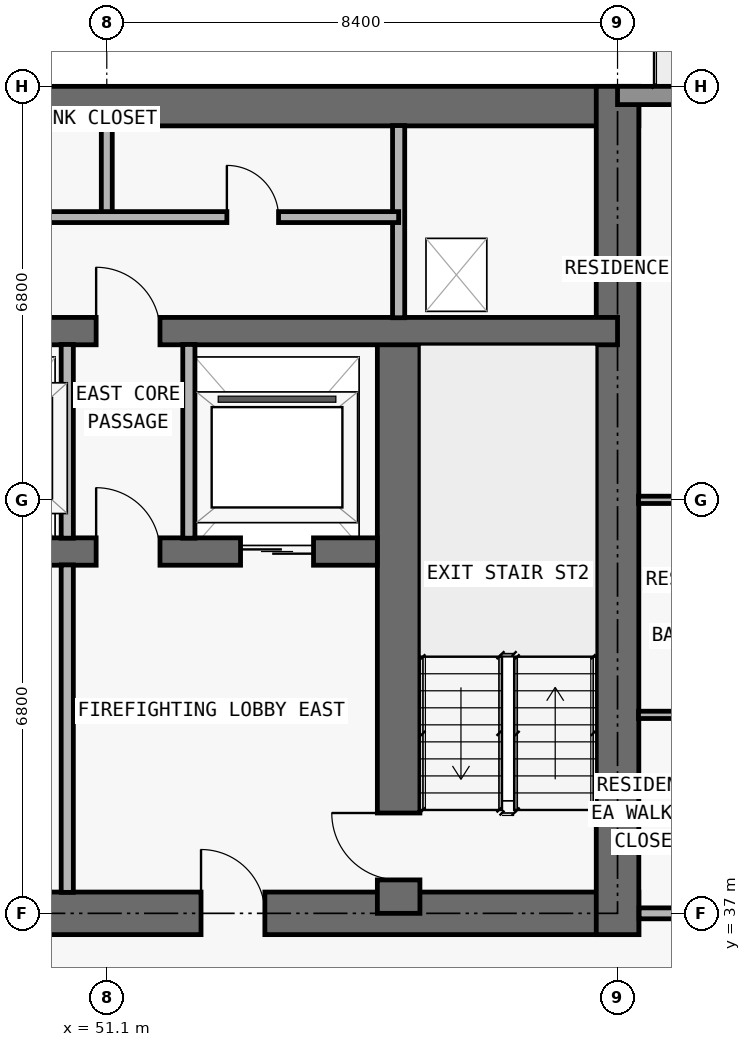
"""IFC4 building model, lengths in metres.
Left out: names, types, materials, properties, quantities, classifications, styles, units other than length and angle.
Written with IfcOpenShell. Run it as: python <this file> out.ifc"""

import sys

from ifc_helpers import new_model, si_unit, direction, frame, frame_2d, origin, place, context, subcontext, project, spatial, rectangle, extrude, element, fill, save


model = new_model("IFC4")
c1 = context("Model", 3, precision=1e-05, world=origin(), true_north=direction((0.0, 1.0)))
c2 = subcontext(c1, "Body", "Model", "MODEL_VIEW")
j1 = project(units=[si_unit("LENGTHUNIT", "METRE"), si_unit("PLANEANGLEUNIT", "RADIAN")], contexts=[c1])
p1 = place(None, origin())
s1 = spatial("IfcSite", under=j1, at=p1, CompositionType="ELEMENT")
p2 = place(p1, origin())
s2 = spatial("IfcBuilding", under=s1, at=p2, CompositionType="ELEMENT")
p3 = place(p2, frame((0.0, 0.0, 211.5)))
s3 = spatial("IfcBuildingStorey", under=s2, at=p3, CompositionType="ELEMENT", Elevation=211.5)
p4 = place(p3, frame((17.95, 37.0, 0.0), z_axis=(0.0, 0.0, 1.0), x_axis=(1.0, 0.0, 0.0)))
e1 = element("IfcWall", 1, at=p4, inside=s3, PredefinedType="SHEAR", context=c2, shape_type="SweptSolid", body=[
    extrude(rectangle(XDim=41.9, YDim=0.7, at=frame_2d((20.95, 0.0))), origin(), (0.0, 0.0, 1.0), 3.05),
])
p5 = place(p4, frame((14.35, 0.0, 0.0)))
e2 = element("IfcOpeningElement", 2, at=p5, cuts=e1, PredefinedType="OPENING", context=c2, shape_type="SweptSolid", body=[
    extrude(rectangle(XDim=1.1, YDim=2.15, at=frame_2d((0.55, 1.075))), frame((0.0, 0.36, 0.0), z_axis=(0.0, -1.0, 0.0), x_axis=(1.0, 0.0, 0.0)), (0.0, 0.0, 1.0), 0.72),
])
p6 = place(p4, frame((6.2, 0.0, 0.0)))
e3 = element("IfcOpeningElement", 3, at=p6, cuts=e1, PredefinedType="OPENING", context=c2, shape_type="SweptSolid", body=[
    extrude(rectangle(XDim=1.05, YDim=2.15, at=frame_2d((0.525, 1.075))), frame((0.0, 0.36, 0.0), z_axis=(0.0, -1.0, 0.0), x_axis=(1.0, 0.0, 0.0)), (0.0, 0.0, 1.0), 0.72),
])
p7 = place(p4, frame((34.7, 0.0, 0.0)))
e4 = element("IfcOpeningElement", 4, at=p7, cuts=e1, PredefinedType="OPENING", context=c2, shape_type="SweptSolid", body=[
    extrude(rectangle(XDim=1.05, YDim=2.15, at=frame_2d((0.525, 1.075))), frame((0.0, 0.36, 0.0), z_axis=(0.0, -1.0, 0.0), x_axis=(1.0, 0.0, 0.0)), (0.0, 0.0, 1.0), 0.72),
])
p8 = place(p4, frame((10.812, 0.0, 0.0)))
e5 = element("IfcOpeningElement", 5, at=p8, cuts=e1, PredefinedType="OPENING", context=c2, shape_type="SweptSolid", body=[
    extrude(rectangle(XDim=1.05, YDim=2.15, at=frame_2d((0.525, 1.075))), frame((0.0, 0.36, 0.0), z_axis=(0.0, -1.0, 0.0), x_axis=(1.0, 0.0, 0.0)), (0.0, 0.0, 1.0), 0.72),
])
p9 = place(p4, frame((24.05, 0.0, 0.0)))
e6 = element("IfcOpeningElement", 6, at=p9, cuts=e1, PredefinedType="OPENING", context=c2, shape_type="SweptSolid", body=[
    extrude(rectangle(XDim=1.05, YDim=2.15, at=frame_2d((0.525, 1.075))), frame((0.0, 0.36, 0.0), z_axis=(0.0, -1.0, 0.0), x_axis=(1.0, 0.0, 0.0)), (0.0, 0.0, 1.0), 0.72),
])
p10 = place(p3, frame((17.95, 50.275, 0.0), z_axis=(0.0, 0.0, 1.0), x_axis=(1.0, 0.0, 0.0)))
e7 = element("IfcWall", 7, at=p10, inside=s3, PredefinedType="SHEAR", context=c2, shape_type="SweptSolid", body=[
    extrude(rectangle(XDim=41.9, YDim=0.65, at=frame_2d((20.95, 0.0))), origin(), (0.0, 0.0, 1.0), 3.05),
])
p11 = place(p3, frame((59.5, 36.65, 0.0), z_axis=(0.0, 0.0, 1.0), x_axis=(0.0, 1.0, 0.0)))
e8 = element("IfcWall", 8, at=p11, inside=s3, PredefinedType="SHEAR", context=c2, shape_type="SweptSolid", body=[
    extrude(rectangle(XDim=13.95, YDim=0.7, at=frame_2d((6.975, 0.0))), origin(), (0.0, 0.0, 1.0), 3.05),
])
p12 = place(p3, frame((55.9, 37.0, 0.0), z_axis=(0.0, 0.0, 1.0), x_axis=(0.0, 1.0, 0.0)))
e9 = element("IfcWall", 9, at=p12, inside=s3, PredefinedType="SHEAR", context=c2, shape_type="SweptSolid", body=[
    extrude(rectangle(XDim=9.575, YDim=0.7, at=frame_2d((4.788, 0.0))), origin(), (0.0, 0.0, 1.0), 3.05),
])
p13 = place(p12, frame((0.55, 0.0, 0.0)))
e10 = element("IfcOpeningElement", 10, at=p13, cuts=e9, PredefinedType="OPENING", context=c2, shape_type="SweptSolid", body=[
    extrude(rectangle(XDim=1.1, YDim=2.15, at=frame_2d((0.55, 1.075))), frame((0.0, 0.36, 0.0), z_axis=(0.0, -1.0, 0.0), x_axis=(1.0, 0.0, 0.0)), (0.0, 0.0, 1.0), 0.72),
])
p14 = place(p3, frame((22.25, 42.95, 0.0), z_axis=(0.0, 0.0, 1.0), x_axis=(1.0, 0.0, 0.0)))
e11 = element("IfcWall", 11, at=p14, inside=s3, PredefinedType="SHEAR", context=c2, shape_type="SweptSolid", body=[
    extrude(rectangle(XDim=33.3, YDim=0.45, at=frame_2d((16.65, 0.0))), origin(), (0.0, 0.0, 1.0), 3.05),
])
p15 = place(p14, frame((1.05, 0.0, 0.0)))
e12 = element("IfcOpeningElement", 12, at=p15, cuts=e11, PredefinedType="OPENING", context=c2, shape_type="SweptSolid", body=[
    extrude(rectangle(XDim=1.2, YDim=2.2, at=frame_2d((0.6, 1.1))), frame((0.0, 0.235, 0.0), z_axis=(0.0, -1.0, 0.0), x_axis=(1.0, 0.0, 0.0)), (0.0, 0.0, 1.0), 0.47),
])
p16 = place(p14, frame((31.05, 0.0, 0.0)))
e13 = element("IfcOpeningElement", 13, at=p16, cuts=e11, PredefinedType="OPENING", context=c2, shape_type="SweptSolid", body=[
    extrude(rectangle(XDim=1.2, YDim=2.2, at=frame_2d((0.6, 1.1))), frame((0.0, 0.235, 0.0), z_axis=(0.0, -1.0, 0.0), x_axis=(1.0, 0.0, 0.0)), (0.0, 0.0, 1.0), 0.47),
])
p17 = place(p14, frame((26.45, 0.0, 0.0)))
e14 = element("IfcOpeningElement", 14, at=p17, cuts=e11, PredefinedType="OPENING", context=c2, shape_type="SweptSolid", body=[
    extrude(rectangle(XDim=1.1, YDim=2.2, at=frame_2d((0.55, 1.1))), frame((0.0, 0.235, 0.0), z_axis=(0.0, -1.0, 0.0), x_axis=(1.0, 0.0, 0.0)), (0.0, 0.0, 1.0), 0.47),
])
p18 = place(p14, frame((5.95, 0.0, 0.0)))
e15 = element("IfcOpeningElement", 15, at=p18, cuts=e11, PredefinedType="OPENING", context=c2, shape_type="SweptSolid", body=[
    extrude(rectangle(XDim=1.1, YDim=2.2, at=frame_2d((0.55, 1.1))), frame((0.0, 0.235, 0.0), z_axis=(0.0, -1.0, 0.0), x_axis=(1.0, 0.0, 0.0)), (0.0, 0.0, 1.0), 0.47),
])
p19 = place(p14, frame((3.625, 0.0, 0.0)))
e16 = element("IfcOpeningElement", 16, at=p19, cuts=e11, PredefinedType="OPENING", context=c2, shape_type="SweptSolid", body=[
    extrude(rectangle(XDim=1.05, YDim=2.15, at=frame_2d((0.525, 1.075))), frame((0.0, 0.235, 0.0), z_axis=(0.0, -1.0, 0.0), x_axis=(1.0, 0.0, 0.0)), (0.0, 0.0, 1.0), 0.47),
])
p20 = place(p14, frame((28.675, 0.0, 0.0)))
e17 = element("IfcOpeningElement", 17, at=p20, cuts=e11, PredefinedType="OPENING", context=c2, shape_type="SweptSolid", body=[
    extrude(rectangle(XDim=1.05, YDim=2.15, at=frame_2d((0.525, 1.075))), frame((0.0, 0.235, 0.0), z_axis=(0.0, -1.0, 0.0), x_axis=(1.0, 0.0, 0.0)), (0.0, 0.0, 1.0), 0.47),
])
p21 = place(p14, frame((15.225, 0.0, 0.0)))
e18 = element("IfcOpeningElement", 18, at=p21, cuts=e11, PredefinedType="OPENING", context=c2, shape_type="SweptSolid", body=[
    extrude(rectangle(XDim=1.0, YDim=2.2, at=frame_2d((0.5, 1.1))), frame((0.0, 0.235, 0.0), z_axis=(0.0, -1.0, 0.0), x_axis=(1.0, 0.0, 0.0)), (0.0, 0.0, 1.0), 0.47),
])
p22 = place(p14, frame((21.975, 0.0, 0.0)))
e19 = element("IfcOpeningElement", 19, at=p22, cuts=e11, PredefinedType="OPENING", context=c2, shape_type="SweptSolid", body=[
    extrude(rectangle(XDim=1.0, YDim=2.2, at=frame_2d((0.5, 1.1))), frame((0.0, 0.235, 0.0), z_axis=(0.0, -1.0, 0.0), x_axis=(1.0, 0.0, 0.0)), (0.0, 0.0, 1.0), 0.47),
])
p23 = place(p3, frame((18.3, 46.575, 0.0), z_axis=(0.0, 0.0, 1.0), x_axis=(1.0, 0.0, 0.0)))
e20 = element("IfcWall", 20, at=p23, inside=s3, PredefinedType="SHEAR", context=c2, shape_type="SweptSolid", body=[
    extrude(rectangle(XDim=41.2, YDim=0.45, at=frame_2d((20.6, 0.0))), origin(), (0.0, 0.0, 1.0), 3.05),
])
p24 = place(p23, frame((7.575, 0.0, 0.0)))
e21 = element("IfcOpeningElement", 21, at=p24, cuts=e20, PredefinedType="OPENING", context=c2, shape_type="SweptSolid", body=[
    extrude(rectangle(XDim=1.05, YDim=2.15, at=frame_2d((0.525, 1.075))), frame((0.0, 0.235, 0.0), z_axis=(0.0, -1.0, 0.0), x_axis=(1.0, 0.0, 0.0)), (0.0, 0.0, 1.0), 0.47),
])
p25 = place(p23, frame((32.625, 0.0, 0.0)))
e22 = element("IfcOpeningElement", 22, at=p25, cuts=e20, PredefinedType="OPENING", context=c2, shape_type="SweptSolid", body=[
    extrude(rectangle(XDim=1.05, YDim=2.15, at=frame_2d((0.525, 1.075))), frame((0.0, 0.235, 0.0), z_axis=(0.0, -1.0, 0.0), x_axis=(1.0, 0.0, 0.0)), (0.0, 0.0, 1.0), 0.47),
])
p26 = place(p3, frame((59.5, 50.45, 0.0), z_axis=(0.0, 0.0, 1.0), x_axis=(1.0, 0.0, 0.0)))
e23 = element("IfcWall", 23, at=p26, inside=s3, PredefinedType="STANDARD", context=c2, shape_type="SweptSolid", body=[
    extrude(rectangle(XDim=8.2, YDim=0.3, at=frame_2d((4.1, 0.0))), origin(), (0.0, 0.0, 1.0), 3.05),
])
p27 = place(p26, frame((3.1, 0.0, 0.0)))
e24 = element("IfcOpeningElement", 24, at=p27, cuts=e23, PredefinedType="OPENING", context=c2, shape_type="SweptSolid", body=[
    extrude(rectangle(XDim=2.0, YDim=2.3, at=frame_2d((1.0, 1.15))), frame((0.0, 0.16, 0.0), z_axis=(0.0, -1.0, 0.0), x_axis=(1.0, 0.0, 0.0)), (0.0, 0.0, 1.0), 0.32),
])
p28 = place(p3, frame((50.45, 37.345, 0.0), z_axis=(0.0, 0.0, 1.0), x_axis=(0.0, 1.0, 0.0)))
e25 = element("IfcWall", 25, at=p28, inside=s3, PredefinedType="PARTITIONING", context=c2, shape_type="SweptSolid", body=[
    extrude(rectangle(XDim=5.385, YDim=0.2, at=frame_2d((2.692, 0.0))), origin(), (0.0, 0.0, 1.0), 3.05),
])
p29 = place(p3, frame((50.45, 43.17, 0.0), z_axis=(0.0, 0.0, 1.0), x_axis=(0.0, 1.0, 0.0)))
e26 = element("IfcWall", 26, at=p29, inside=s3, PredefinedType="PARTITIONING", context=c2, shape_type="SweptSolid", body=[
    extrude(rectangle(XDim=3.185, YDim=0.2, at=frame_2d((1.593, 0.0))), origin(), (0.0, 0.0, 1.0), 3.05),
])
p30 = place(p3, frame((51.1, 48.45, 0.0), z_axis=(0.0, 0.0, 1.0), x_axis=(0.0, 1.0, 0.0)))
e27 = element("IfcWall", 27, at=p30, inside=s3, PredefinedType="PARTITIONING", context=c2, shape_type="SweptSolid", body=[
    extrude(rectangle(XDim=1.505, YDim=0.18, at=frame_2d((0.752, 0.0))), origin(), (0.0, 0.0, 1.0), 3.05),
])
p31 = place(p3, frame((52.45, 43.17, 0.0), z_axis=(0.0, 0.0, 1.0), x_axis=(0.0, 1.0, 0.0)))
e28 = element("IfcWall", 28, at=p31, inside=s3, PredefinedType="PARTITIONING", context=c2, shape_type="SweptSolid", body=[
    extrude(rectangle(XDim=3.185, YDim=0.2, at=frame_2d((1.593, 0.0))), origin(), (0.0, 0.0, 1.0), 3.05),
])
p32 = place(p3, frame((55.9, 46.795, 0.0), z_axis=(0.0, 0.0, 1.0), x_axis=(0.0, 1.0, 0.0)))
e29 = element("IfcWall", 29, at=p32, inside=s3, PredefinedType="PARTITIONING", context=c2, shape_type="SweptSolid", body=[
    extrude(rectangle(XDim=3.16, YDim=0.2, at=frame_2d((1.58, 0.0))), origin(), (0.0, 0.0, 1.0), 3.05),
])
p33 = place(p3, frame((59.855, 37.0, 0.0), z_axis=(0.0, 0.0, 1.0), x_axis=(1.0, 0.0, 0.0)))
e30 = element("IfcWall", 30, at=p33, inside=s3, PredefinedType="PARTITIONING", context=c2, shape_type="SweptSolid", body=[
    extrude(rectangle(XDim=7.845, YDim=0.18, at=frame_2d((3.922, 0.0))), origin(), (0.0, 0.0, 1.0), 3.05),
])
p34 = place(p33, frame((3.349, 0.0, 0.0)))
e31 = element("IfcOpeningElement", 31, at=p34, cuts=e30, PredefinedType="OPENING", context=c2, shape_type="SweptSolid", body=[
    extrude(rectangle(XDim=1.0, YDim=2.2, at=frame_2d((0.5, 1.1))), frame((0.0, 0.1, 0.0), z_axis=(0.0, -1.0, 0.0), x_axis=(1.0, 0.0, 0.0)), (0.0, 0.0, 1.0), 0.2),
])
p35 = place(p3, frame((59.845, 40.264, 0.0), z_axis=(0.0, 0.0, 1.0), x_axis=(1.0, 0.0, 0.0)))
e32 = element("IfcWall", 32, at=p35, inside=s3, PredefinedType="PARTITIONING", context=c2, shape_type="SweptSolid", body=[
    extrude(rectangle(XDim=2.305, YDim=0.12, at=frame_2d((1.152, 0.0))), origin(), (0.0, 0.0, 1.0), 3.05),
])
p36 = place(p3, frame((59.845, 43.8, 0.0), z_axis=(0.0, 0.0, 1.0), x_axis=(1.0, 0.0, 0.0)))
e33 = element("IfcWall", 33, at=p36, inside=s3, PredefinedType="PARTITIONING", context=c2, shape_type="SweptSolid", body=[
    extrude(rectangle(XDim=11.56, YDim=0.12, at=frame_2d((5.78, 0.0))), origin(), (0.0, 0.0, 1.0), 2.418),
])
p37 = place(p36, frame((3.409, 0.0, 0.0)))
e34 = element("IfcOpeningElement", 34, at=p37, cuts=e33, PredefinedType="OPENING", context=c2, shape_type="SweptSolid", body=[
    extrude(rectangle(XDim=0.9, YDim=2.15, at=frame_2d((0.45, 1.075))), frame((0.0, 0.07, 0.0), z_axis=(0.0, -1.0, 0.0), x_axis=(1.0, 0.0, 0.0)), (0.0, 0.0, 1.0), 0.14),
])
p38 = place(p36, frame((0.728, 0.0, 0.0)))
e35 = element("IfcOpeningElement", 35, at=p38, cuts=e33, PredefinedType="OPENING", context=c2, shape_type="SweptSolid", body=[
    extrude(rectangle(XDim=0.85, YDim=2.1, at=frame_2d((0.425, 1.05))), frame((0.0, 0.07, 0.0), z_axis=(0.0, -1.0, 0.0), x_axis=(1.0, 0.0, 0.0)), (0.0, 0.0, 1.0), 0.14),
])
p39 = place(p3, frame((26.7, 48.45, 0.0), z_axis=(0.0, 0.0, 1.0), x_axis=(1.0, 0.0, 0.0)))
e36 = element("IfcWall", 36, at=p39, inside=s3, PredefinedType="PARTITIONING", context=c2, shape_type="SweptSolid", body=[
    extrude(rectangle(XDim=29.2, YDim=0.18, at=frame_2d((14.6, 0.0))), origin(), (0.0, 0.0, 1.0), 3.05),
])
p40 = place(p39, frame((1.75, 0.0, 0.0)))
e37 = element("IfcOpeningElement", 37, at=p40, cuts=e36, PredefinedType="OPENING", context=c2, shape_type="SweptSolid", body=[
    extrude(rectangle(XDim=1.2, YDim=2.2, at=frame_2d((0.6, 1.1))), frame((0.0, 0.1, 0.0), z_axis=(0.0, -1.0, 0.0), x_axis=(1.0, 0.0, 0.0)), (0.0, 0.0, 1.0), 0.2),
])
p41 = place(p39, frame((6.475, 0.0, 0.0)))
e38 = element("IfcOpeningElement", 38, at=p41, cuts=e36, PredefinedType="OPENING", context=c2, shape_type="SweptSolid", body=[
    extrude(rectangle(XDim=1.2, YDim=2.2, at=frame_2d((0.6, 1.1))), frame((0.0, 0.1, 0.0), z_axis=(0.0, -1.0, 0.0), x_axis=(1.0, 0.0, 0.0)), (0.0, 0.0, 1.0), 0.2),
])
p42 = place(p39, frame((14.05, 0.0, 0.0)))
e39 = element("IfcOpeningElement", 39, at=p42, cuts=e36, PredefinedType="OPENING", context=c2, shape_type="SweptSolid", body=[
    extrude(rectangle(XDim=1.0, YDim=2.2, at=frame_2d((0.5, 1.1))), frame((0.0, 0.1, 0.0), z_axis=(0.0, -1.0, 0.0), x_axis=(1.0, 0.0, 0.0)), (0.0, 0.0, 1.0), 0.2),
])
p43 = place(p39, frame((21.425, 0.0, 0.0)))
e40 = element("IfcOpeningElement", 40, at=p43, cuts=e36, PredefinedType="OPENING", context=c2, shape_type="SweptSolid", body=[
    extrude(rectangle(XDim=1.2, YDim=2.2, at=frame_2d((0.6, 1.1))), frame((0.0, 0.1, 0.0), z_axis=(0.0, -1.0, 0.0), x_axis=(1.0, 0.0, 0.0)), (0.0, 0.0, 1.0), 0.2),
])
p44 = place(p39, frame((26.375, 0.0, 0.0)))
e41 = element("IfcOpeningElement", 41, at=p44, cuts=e36, PredefinedType="OPENING", context=c2, shape_type="SweptSolid", body=[
    extrude(rectangle(XDim=0.85, YDim=2.1, at=frame_2d((0.425, 1.05))), frame((0.0, 0.1, 0.0), z_axis=(0.0, -1.0, 0.0), x_axis=(1.0, 0.0, 0.0)), (0.0, 0.0, 1.0), 0.2),
])
p45 = place(p16, origin())
e42 = element("IfcDoor", 42, at=p45, inside=s3, OperationType="DOUBLE_DOOR_SLIDING", PredefinedType="DOOR", context=c2, shape_type="SweptSolid", body=[
    extrude(rectangle(XDim=1.2, YDim=2.2, at=frame_2d((0.6, 1.1))), frame((0.0, 0.025, 0.0), z_axis=(0.0, -1.0, 0.0), x_axis=(1.0, 0.0, 0.0)), (0.0, 0.0, 1.0), 0.05),
])
fill(e13, e42)
p46 = place(p7, origin())
e43 = element("IfcDoor", 43, at=p46, inside=s3, OperationType="SINGLE_SWING_LEFT", PredefinedType="DOOR", context=c2, shape_type="SweptSolid", body=[
    extrude(rectangle(XDim=1.05, YDim=2.15, at=frame_2d((0.525, 1.075))), frame((0.0, 0.025, 0.0), z_axis=(0.0, -1.0, 0.0), x_axis=(1.0, 0.0, 0.0)), (0.0, 0.0, 1.0), 0.05),
])
fill(e4, e43)
p47 = place(p13, origin())
e44 = element("IfcDoor", 44, at=p47, inside=s3, OperationType="SINGLE_SWING_RIGHT", PredefinedType="DOOR", context=c2, shape_type="SweptSolid", body=[
    extrude(rectangle(XDim=1.1, YDim=2.15, at=frame_2d((0.55, 1.075))), frame((0.0, 0.025, 0.0), z_axis=(0.0, -1.0, 0.0), x_axis=(1.0, 0.0, 0.0)), (0.0, 0.0, 1.0), 0.05),
])
fill(e10, e44)
p48 = place(p20, origin())
e45 = element("IfcDoor", 45, at=p48, inside=s3, OperationType="SINGLE_SWING_LEFT", PredefinedType="DOOR", context=c2, shape_type="SweptSolid", body=[
    extrude(rectangle(XDim=1.05, YDim=2.15, at=frame_2d((0.525, 1.075))), frame((0.0, 0.025, 0.0), z_axis=(0.0, -1.0, 0.0), x_axis=(1.0, 0.0, 0.0)), (0.0, 0.0, 1.0), 0.05),
])
fill(e17, e45)
p49 = place(p25, origin())
e46 = element("IfcDoor", 46, at=p49, inside=s3, OperationType="SINGLE_SWING_LEFT", PredefinedType="DOOR", context=c2, shape_type="SweptSolid", body=[
    extrude(rectangle(XDim=1.05, YDim=2.15, at=frame_2d((0.525, 1.075))), frame((0.0, 0.025, 0.0), z_axis=(0.0, -1.0, 0.0), x_axis=(1.0, 0.0, 0.0)), (0.0, 0.0, 1.0), 0.05),
])
fill(e22, e46)
p50 = place(p44, origin())
e47 = element("IfcDoor", 47, at=p50, inside=s3, OperationType="SINGLE_SWING_LEFT", PredefinedType="DOOR", context=c2, shape_type="SweptSolid", body=[
    extrude(rectangle(XDim=0.85, YDim=2.1, at=frame_2d((0.425, 1.05))), frame((0.0, 0.025, 0.0), z_axis=(0.0, -1.0, 0.0), x_axis=(1.0, 0.0, 0.0)), (0.0, 0.0, 1.0), 0.05),
])
fill(e41, e47)
save(model, sys.argv[1])
